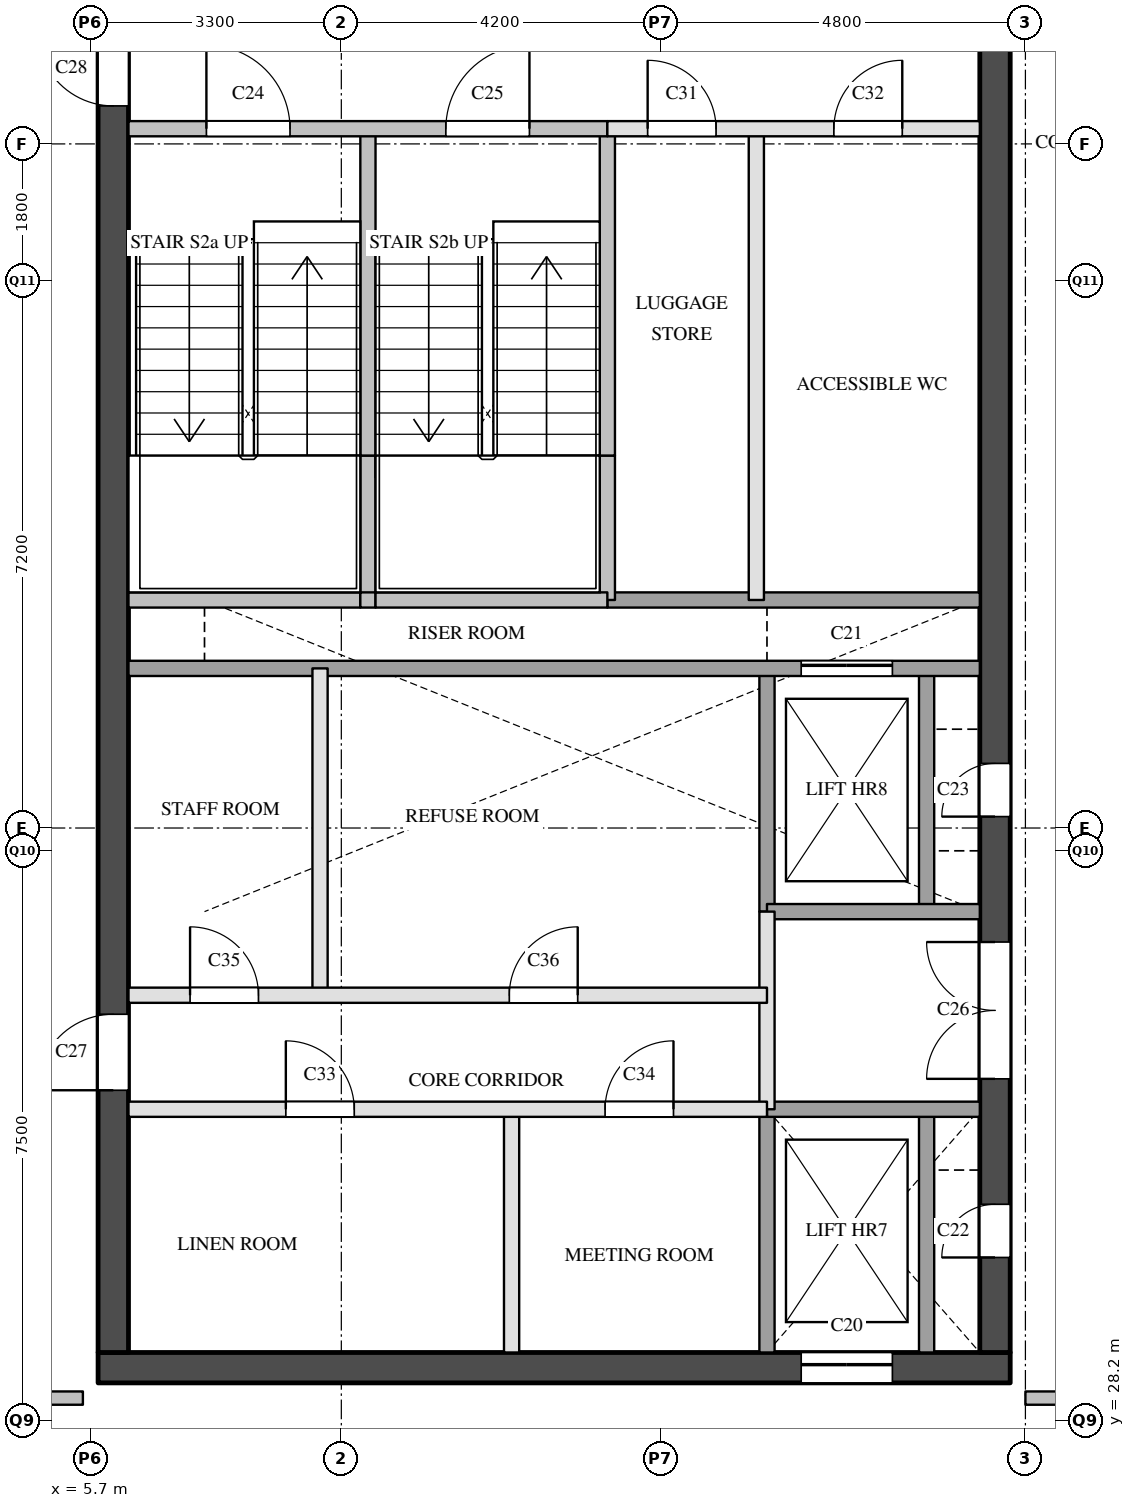
"""IFC4 building model, lengths in metres.
Left out: names, types, materials, properties, quantities, classifications, styles, units other than length and angle.
Written with IfcOpenShell. Run it as: python <this file> out.ifc"""

import sys

from ifc_helpers import new_model, si_unit, direction, frame, frame_2d, origin, place, context, subcontext, project, spatial, rectangle, extrude, element, fill, save


model = new_model("IFC4")
c1 = context("Model", 3, precision=1e-05, world=origin(), true_north=direction((0.0, 1.0)))
c2 = subcontext(c1, "Body", "Model", "MODEL_VIEW")
j1 = project(units=[si_unit("LENGTHUNIT", "METRE"), si_unit("PLANEANGLEUNIT", "RADIAN")], contexts=[c1])
p1 = place(None, origin())
s1 = spatial("IfcSite", under=j1, at=p1, CompositionType="ELEMENT")
p2 = place(p1, origin())
s2 = spatial("IfcBuilding", under=s1, at=p2, CompositionType="ELEMENT")
p3 = place(p2, frame((0.0, 0.0, 218.9)))
s3 = spatial("IfcBuildingStorey", under=s2, at=p3, CompositionType="ELEMENT", Elevation=218.9)
p4 = place(p3, frame((5.8, 28.9, 0.0), z_axis=(0.0, 0.0, 1.0), x_axis=(1.0, 0.0, 0.0)))
e1 = element("IfcWall", 1, at=p4, inside=s3, PredefinedType="SHEAR", context=c2, shape_type="SweptSolid", body=[
    extrude(rectangle(XDim=12.0, YDim=0.4, at=frame_2d((6.0, 0.0))), origin(), (0.0, 0.0, 1.0), 3.6),
])
p5 = place(p4, frame((9.25, 0.0, 0.0)))
e2 = element("IfcOpeningElement", 2, at=p5, cuts=e1, PredefinedType="OPENING", context=c2, shape_type="SweptSolid", body=[
    extrude(rectangle(XDim=1.2, YDim=2.1, at=frame_2d((0.6, 1.05))), frame((0.0, 0.21, 0.0), z_axis=(0.0, -1.0, 0.0), x_axis=(1.0, 0.0, 0.0)), (0.0, 0.0, 1.0), 0.42),
])
p6 = place(p3, frame((6.0, 29.1, 0.0), z_axis=(0.0, 0.0, 1.0), x_axis=(0.0, 1.0, 0.0)))
e3 = element("IfcWall", 3, at=p6, inside=s3, PredefinedType="SHEAR", context=c2, shape_type="SweptSolid", body=[
    extrude(rectangle(XDim=20.3, YDim=0.4, at=frame_2d((10.15, 0.0))), origin(), (0.0, 0.0, 1.0), 3.6),
])
p7 = place(p6, frame((3.45, 0.0, 0.0)))
e4 = element("IfcOpeningElement", 4, at=p7, cuts=e3, PredefinedType="OPENING", context=c2, shape_type="SweptSolid", body=[
    extrude(rectangle(XDim=1.0, YDim=2.1, at=frame_2d((0.5, 1.05))), frame((0.0, 0.21, 0.0), z_axis=(0.0, -1.0, 0.0), x_axis=(1.0, 0.0, 0.0)), (0.0, 0.0, 1.0), 0.42),
])
p8 = place(p6, frame((16.4, 0.0, 0.0)))
e5 = element("IfcOpeningElement", 5, at=p8, cuts=e3, PredefinedType="OPENING", context=c2, shape_type="SweptSolid", body=[
    extrude(rectangle(XDim=1.0, YDim=2.1, at=frame_2d((0.5, 1.05))), frame((0.0, 0.21, 0.0), z_axis=(0.0, -1.0, 0.0), x_axis=(1.0, 0.0, 0.0)), (0.0, 0.0, 1.0), 0.42),
])
p9 = place(p3, frame((17.6, 29.1, 0.0), z_axis=(0.0, 0.0, 1.0), x_axis=(0.0, 1.0, 0.0)))
e6 = element("IfcWall", 6, at=p9, inside=s3, PredefinedType="SHEAR", context=c2, shape_type="SweptSolid", body=[
    extrude(rectangle(XDim=20.3, YDim=0.4, at=frame_2d((10.15, 0.0))), origin(), (0.0, 0.0, 1.0), 3.6),
])
p10 = place(p9, frame((1.25, 0.0, 0.0)))
e7 = element("IfcOpeningElement", 7, at=p10, cuts=e6, PredefinedType="OPENING", context=c2, shape_type="SweptSolid", body=[
    extrude(rectangle(XDim=0.7, YDim=2.1, at=frame_2d((0.35, 1.05))), frame((0.0, 0.21, 0.0), z_axis=(0.0, -1.0, 0.0), x_axis=(1.0, 0.0, 0.0)), (0.0, 0.0, 1.0), 0.42),
])
p11 = place(p9, frame((7.05, 0.0, 0.0)))
e8 = element("IfcOpeningElement", 8, at=p11, cuts=e6, PredefinedType="OPENING", context=c2, shape_type="SweptSolid", body=[
    extrude(rectangle(XDim=0.7, YDim=2.1, at=frame_2d((0.35, 1.05))), frame((0.0, 0.21, 0.0), z_axis=(0.0, -1.0, 0.0), x_axis=(1.0, 0.0, 0.0)), (0.0, 0.0, 1.0), 0.42),
])
p12 = place(p9, frame((3.6, 0.0, 0.0)))
e9 = element("IfcOpeningElement", 9, at=p12, cuts=e6, PredefinedType="OPENING", context=c2, shape_type="SweptSolid", body=[
    extrude(rectangle(XDim=1.8, YDim=2.1, at=frame_2d((0.9, 1.05))), frame((0.0, 0.21, 0.0), z_axis=(0.0, -1.0, 0.0), x_axis=(1.0, 0.0, 0.0)), (0.0, 0.0, 1.0), 0.42),
])
p13 = place(p3, frame((8.72, 33.8, 0.0), z_axis=(0.0, 0.0, 1.0), x_axis=(0.0, 1.0, 0.0)))
e10 = element("IfcWall", 10, at=p13, inside=s3, PredefinedType="PARTITIONING", context=c2, shape_type="SweptSolid", body=[
    extrude(rectangle(XDim=4.3, YDim=0.2, at=frame_2d((2.15, 0.0))), origin(), (0.0, 0.0, 1.0), 3.6),
])
p14 = place(p3, frame((9.35, 39.0, 0.0), z_axis=(0.0, 0.0, 1.0), x_axis=(0.0, 1.0, 0.0)))
e11 = element("IfcWall", 11, at=p14, inside=s3, PredefinedType="SOLIDWALL", context=c2, shape_type="SweptSolid", body=[
    extrude(rectangle(XDim=1.9, YDim=0.2, at=frame_2d((0.95, 0.0))), origin(), (0.0, 0.0, 1.0), 3.6),
])
p15 = place(p3, frame((9.35, 40.9, 0.0), z_axis=(0.0, 0.0, 1.0), x_axis=(0.0, 1.0, 0.0)))
e12 = element("IfcWall", 12, at=p15, inside=s3, PredefinedType="SOLIDWALL", context=c2, shape_type="SweptSolid", body=[
    extrude(rectangle(XDim=4.3, YDim=0.2, at=frame_2d((2.15, 0.0))), origin(), (0.0, 0.0, 1.0), 3.6),
])
p16 = place(p3, frame((11.24, 29.1, 0.0), z_axis=(0.0, 0.0, 1.0), x_axis=(0.0, 1.0, 0.0)))
e13 = element("IfcWall", 13, at=p16, inside=s3, PredefinedType="PARTITIONING", context=c2, shape_type="SweptSolid", body=[
    extrude(rectangle(XDim=3.2, YDim=0.2, at=frame_2d((1.6, 0.0))), origin(), (0.0, 0.0, 1.0), 3.6),
])
p17 = place(p3, frame((12.5, 39.0, 0.0), z_axis=(0.0, 0.0, 1.0), x_axis=(0.0, 1.0, 0.0)))
e14 = element("IfcWall", 14, at=p17, inside=s3, PredefinedType="SOLIDWALL", context=c2, shape_type="SweptSolid", body=[
    extrude(rectangle(XDim=1.9, YDim=0.2, at=frame_2d((0.95, 0.0))), origin(), (0.0, 0.0, 1.0), 3.6),
])
p18 = place(p3, frame((12.5, 40.9, 0.0), z_axis=(0.0, 0.0, 1.0), x_axis=(0.0, 1.0, 0.0)))
e15 = element("IfcWall", 15, at=p18, inside=s3, PredefinedType="SOLIDWALL", context=c2, shape_type="SweptSolid", body=[
    extrude(rectangle(XDim=4.3, YDim=0.2, at=frame_2d((2.15, 0.0))), origin(), (0.0, 0.0, 1.0), 3.6),
])
p19 = place(p3, frame((14.46, 39.0, 0.0), z_axis=(0.0, 0.0, 1.0), x_axis=(0.0, 1.0, 0.0)))
e16 = element("IfcWall", 16, at=p19, inside=s3, PredefinedType="PARTITIONING", context=c2, shape_type="SweptSolid", body=[
    extrude(rectangle(XDim=6.2, YDim=0.2, at=frame_2d((3.1, 0.0))), origin(), (0.0, 0.0, 1.0), 3.6),
])
p20 = place(p3, frame((14.6, 32.3, 0.0), z_axis=(0.0, 0.0, 1.0), x_axis=(0.0, 1.0, 0.0)))
e17 = element("IfcWall", 17, at=p20, inside=s3, PredefinedType="PARTITIONING", context=c2, shape_type="SweptSolid", body=[
    extrude(rectangle(XDim=2.6, YDim=0.2, at=frame_2d((1.3, 0.0))), origin(), (0.0, 0.0, 1.0), 3.6),
])
p21 = place(p3, frame((14.6, 29.1, 0.0), z_axis=(0.0, 0.0, 1.0), x_axis=(0.0, 1.0, 0.0)))
e18 = element("IfcWall", 18, at=p21, inside=s3, PredefinedType="SOLIDWALL", context=c2, shape_type="SweptSolid", body=[
    extrude(rectangle(XDim=3.2, YDim=0.2, at=frame_2d((1.6, 0.0))), origin(), (0.0, 0.0, 1.0), 3.6),
])
p22 = place(p3, frame((14.6, 34.9, 0.0), z_axis=(0.0, 0.0, 1.0), x_axis=(0.0, 1.0, 0.0)))
e19 = element("IfcWall", 19, at=p22, inside=s3, PredefinedType="SOLIDWALL", context=c2, shape_type="SweptSolid", body=[
    extrude(rectangle(XDim=3.2, YDim=0.2, at=frame_2d((1.6, 0.0))), origin(), (0.0, 0.0, 1.0), 3.6),
])
p23 = place(p3, frame((16.7, 29.1, 0.0), z_axis=(0.0, 0.0, 1.0), x_axis=(0.0, 1.0, 0.0)))
e20 = element("IfcWall", 20, at=p23, inside=s3, PredefinedType="SOLIDWALL", context=c2, shape_type="SweptSolid", body=[
    extrude(rectangle(XDim=3.2, YDim=0.2, at=frame_2d((1.6, 0.0))), origin(), (0.0, 0.0, 1.0), 3.6),
])
p24 = place(p3, frame((16.7, 34.9, 0.0), z_axis=(0.0, 0.0, 1.0), x_axis=(0.0, 1.0, 0.0)))
e21 = element("IfcWall", 21, at=p24, inside=s3, PredefinedType="SOLIDWALL", context=c2, shape_type="SweptSolid", body=[
    extrude(rectangle(XDim=3.2, YDim=0.2, at=frame_2d((1.6, 0.0))), origin(), (0.0, 0.0, 1.0), 3.6),
])
p25 = place(p3, frame((6.2, 32.3, 0.0), z_axis=(0.0, 0.0, 1.0), x_axis=(1.0, 0.0, 0.0)))
e22 = element("IfcWall", 22, at=p25, inside=s3, PredefinedType="PARTITIONING", context=c2, shape_type="SweptSolid", body=[
    extrude(rectangle(XDim=8.4, YDim=0.2, at=frame_2d((4.2, 0.0))), origin(), (0.0, 0.0, 1.0), 3.6),
])
p26 = place(p25, frame((2.07, 0.0, 0.0)))
e23 = element("IfcOpeningElement", 23, at=p26, cuts=e22, PredefinedType="OPENING", context=c2, shape_type="SweptSolid", body=[
    extrude(rectangle(XDim=0.9, YDim=2.1, at=frame_2d((0.45, 1.05))), frame((0.0, 0.11, 0.0), z_axis=(0.0, -1.0, 0.0), x_axis=(1.0, 0.0, 0.0)), (0.0, 0.0, 1.0), 0.22),
])
p27 = place(p25, frame((6.27, 0.0, 0.0)))
e24 = element("IfcOpeningElement", 24, at=p27, cuts=e22, PredefinedType="OPENING", context=c2, shape_type="SweptSolid", body=[
    extrude(rectangle(XDim=0.9, YDim=2.1, at=frame_2d((0.45, 1.05))), frame((0.0, 0.11, 0.0), z_axis=(0.0, -1.0, 0.0), x_axis=(1.0, 0.0, 0.0)), (0.0, 0.0, 1.0), 0.22),
])
p28 = place(p3, frame((14.6, 32.3, 0.0), z_axis=(0.0, 0.0, 1.0), x_axis=(1.0, 0.0, 0.0)))
e25 = element("IfcWall", 25, at=p28, inside=s3, PredefinedType="SOLIDWALL", context=c2, shape_type="SweptSolid", body=[
    extrude(rectangle(XDim=2.8, YDim=0.2, at=frame_2d((1.4, 0.0))), origin(), (0.0, 0.0, 1.0), 3.6),
])
p29 = place(p3, frame((6.2, 33.8, 0.0), z_axis=(0.0, 0.0, 1.0), x_axis=(1.0, 0.0, 0.0)))
e26 = element("IfcWall", 26, at=p29, inside=s3, PredefinedType="PARTITIONING", context=c2, shape_type="SweptSolid", body=[
    extrude(rectangle(XDim=8.4, YDim=0.2, at=frame_2d((4.2, 0.0))), origin(), (0.0, 0.0, 1.0), 3.6),
])
p30 = place(p29, frame((0.81, 0.0, 0.0)))
e27 = element("IfcOpeningElement", 27, at=p30, cuts=e26, PredefinedType="OPENING", context=c2, shape_type="SweptSolid", body=[
    extrude(rectangle(XDim=0.9, YDim=2.1, at=frame_2d((0.45, 1.05))), frame((0.0, 0.11, 0.0), z_axis=(0.0, -1.0, 0.0), x_axis=(1.0, 0.0, 0.0)), (0.0, 0.0, 1.0), 0.22),
])
p31 = place(p29, frame((5.01, 0.0, 0.0)))
e28 = element("IfcOpeningElement", 28, at=p31, cuts=e26, PredefinedType="OPENING", context=c2, shape_type="SweptSolid", body=[
    extrude(rectangle(XDim=0.9, YDim=2.1, at=frame_2d((0.45, 1.05))), frame((0.0, 0.11, 0.0), z_axis=(0.0, -1.0, 0.0), x_axis=(1.0, 0.0, 0.0)), (0.0, 0.0, 1.0), 0.22),
])
p32 = place(p3, frame((14.6, 34.9, 0.0), z_axis=(0.0, 0.0, 1.0), x_axis=(1.0, 0.0, 0.0)))
e29 = element("IfcWall", 29, at=p32, inside=s3, PredefinedType="SOLIDWALL", context=c2, shape_type="SweptSolid", body=[
    extrude(rectangle(XDim=2.8, YDim=0.2, at=frame_2d((1.4, 0.0))), origin(), (0.0, 0.0, 1.0), 3.6),
])
p33 = place(p3, frame((6.2, 38.1, 0.0), z_axis=(0.0, 0.0, 1.0), x_axis=(1.0, 0.0, 0.0)))
e30 = element("IfcWall", 30, at=p33, inside=s3, PredefinedType="SOLIDWALL", context=c2, shape_type="SweptSolid", body=[
    extrude(rectangle(XDim=11.2, YDim=0.2, at=frame_2d((5.6, 0.0))), origin(), (0.0, 0.0, 1.0), 3.6),
])
p34 = place(p33, frame((8.85, 0.0, 0.0)))
e31 = element("IfcOpeningElement", 31, at=p34, cuts=e30, PredefinedType="OPENING", context=c2, shape_type="SweptSolid", body=[
    extrude(rectangle(XDim=1.2, YDim=2.1, at=frame_2d((0.6, 1.05))), frame((0.0, 0.11, 0.0), z_axis=(0.0, -1.0, 0.0), x_axis=(1.0, 0.0, 0.0)), (0.0, 0.0, 1.0), 0.22),
])
p35 = place(p3, frame((12.5, 39.0, 0.0), z_axis=(0.0, 0.0, 1.0), x_axis=(1.0, 0.0, 0.0)))
e32 = element("IfcWall", 32, at=p35, inside=s3, PredefinedType="SOLIDWALL", context=c2, shape_type="SweptSolid", body=[
    extrude(rectangle(XDim=4.9, YDim=0.2, at=frame_2d((2.45, 0.0))), origin(), (0.0, 0.0, 1.0), 3.6),
])
p36 = place(p3, frame((6.2, 39.0, 0.0), z_axis=(0.0, 0.0, 1.0), x_axis=(1.0, 0.0, 0.0)))
e33 = element("IfcWall", 33, at=p36, inside=s3, PredefinedType="SOLIDWALL", context=c2, shape_type="SweptSolid", body=[
    extrude(rectangle(XDim=3.05, YDim=0.2, at=frame_2d((1.525, 0.0))), origin(), (0.0, 0.0, 1.0), 3.6),
])
p37 = place(p3, frame((9.25, 39.0, 0.0), z_axis=(0.0, 0.0, 1.0), x_axis=(1.0, 0.0, 0.0)))
e34 = element("IfcWall", 34, at=p37, inside=s3, PredefinedType="SOLIDWALL", context=c2, shape_type="SweptSolid", body=[
    extrude(rectangle(XDim=0.2, YDim=0.2, at=frame_2d((0.1, 0.0))), origin(), (0.0, 0.0, 1.0), 3.6),
])
p38 = place(p3, frame((9.45, 39.0, 0.0), z_axis=(0.0, 0.0, 1.0), x_axis=(1.0, 0.0, 0.0)))
e35 = element("IfcWall", 35, at=p38, inside=s3, PredefinedType="SOLIDWALL", context=c2, shape_type="SweptSolid", body=[
    extrude(rectangle(XDim=3.05, YDim=0.2, at=frame_2d((1.525, 0.0))), origin(), (0.0, 0.0, 1.0), 3.6),
])
p39 = place(p3, frame((12.5, 45.2, 0.0), z_axis=(0.0, 0.0, 1.0), x_axis=(1.0, 0.0, 0.0)))
e36 = element("IfcWall", 36, at=p39, inside=s3, PredefinedType="PARTITIONING", context=c2, shape_type="SweptSolid", body=[
    extrude(rectangle(XDim=4.9, YDim=0.2, at=frame_2d((2.45, 0.0))), origin(), (0.0, 0.0, 1.0), 3.6),
])
p40 = place(p39, frame((0.53, 0.0, 0.0)))
e37 = element("IfcOpeningElement", 37, at=p40, cuts=e36, PredefinedType="OPENING", context=c2, shape_type="SweptSolid", body=[
    extrude(rectangle(XDim=0.9, YDim=2.1, at=frame_2d((0.45, 1.05))), frame((0.0, 0.11, 0.0), z_axis=(0.0, -1.0, 0.0), x_axis=(1.0, 0.0, 0.0)), (0.0, 0.0, 1.0), 0.22),
])
p41 = place(p39, frame((2.98, 0.0, 0.0)))
e38 = element("IfcOpeningElement", 38, at=p41, cuts=e36, PredefinedType="OPENING", context=c2, shape_type="SweptSolid", body=[
    extrude(rectangle(XDim=0.9, YDim=2.1, at=frame_2d((0.45, 1.05))), frame((0.0, 0.11, 0.0), z_axis=(0.0, -1.0, 0.0), x_axis=(1.0, 0.0, 0.0)), (0.0, 0.0, 1.0), 0.22),
])
p42 = place(p3, frame((6.2, 45.2, 0.0), z_axis=(0.0, 0.0, 1.0), x_axis=(1.0, 0.0, 0.0)))
e39 = element("IfcWall", 39, at=p42, inside=s3, PredefinedType="SOLIDWALL", context=c2, shape_type="SweptSolid", body=[
    extrude(rectangle(XDim=6.3, YDim=0.2, at=frame_2d((3.15, 0.0))), origin(), (0.0, 0.0, 1.0), 3.6),
])
p43 = place(p42, frame((1.025, 0.0, 0.0)))
e40 = element("IfcOpeningElement", 40, at=p43, cuts=e39, PredefinedType="OPENING", context=c2, shape_type="SweptSolid", body=[
    extrude(rectangle(XDim=1.1, YDim=2.1, at=frame_2d((0.55, 1.05))), frame((0.0, 0.11, 0.0), z_axis=(0.0, -1.0, 0.0), x_axis=(1.0, 0.0, 0.0)), (0.0, 0.0, 1.0), 0.22),
])
p44 = place(p42, frame((4.175, 0.0, 0.0)))
e41 = element("IfcOpeningElement", 41, at=p44, cuts=e39, PredefinedType="OPENING", context=c2, shape_type="SweptSolid", body=[
    extrude(rectangle(XDim=1.1, YDim=2.1, at=frame_2d((0.55, 1.05))), frame((0.0, 0.11, 0.0), z_axis=(0.0, -1.0, 0.0), x_axis=(1.0, 0.0, 0.0)), (0.0, 0.0, 1.0), 0.22),
])
for number, where, z_axis, x_axis in (
    (42, (4.1, 28.5, 0.0), (0.0, 0.0, 1.0), (1.0, 0.0, 0.0)),
    (43, (18.0, 28.5, 0.0), (0.0, 0.0, 1.0), (1.0, 0.0, 0.0)),
):
    element("IfcWall", number, at=place(p3, frame(where, z_axis=z_axis, x_axis=x_axis)), inside=s3, PredefinedType="PARTITIONING", context=c2, shape_type="SweptSolid", body=[
        extrude(rectangle(XDim=1.5, YDim=0.175, at=frame_2d((0.75, 0.0))), origin(), (0.0, 0.0, 1.0), 3.6),
    ])
p45 = place(p5, origin())
e44 = element("IfcDoor", 44, at=p45, inside=s3, OperationType="SLIDING_TO_LEFT", PredefinedType="DOOR", context=c2, shape_type="SweptSolid", body=[
    extrude(rectangle(XDim=1.2, YDim=2.1, at=frame_2d((0.6, 1.05))), frame((0.0, 0.025, 0.0), z_axis=(0.0, -1.0, 0.0), x_axis=(1.0, 0.0, 0.0)), (0.0, 0.0, 1.0), 0.05),
])
fill(e2, e44)
p46 = place(p34, origin())
e45 = element("IfcDoor", 45, at=p46, inside=s3, OperationType="SLIDING_TO_LEFT", PredefinedType="DOOR", context=c2, shape_type="SweptSolid", body=[
    extrude(rectangle(XDim=1.2, YDim=2.1, at=frame_2d((0.6, 1.05))), frame((0.0, 0.025, 0.0), z_axis=(0.0, -1.0, 0.0), x_axis=(1.0, 0.0, 0.0)), (0.0, 0.0, 1.0), 0.05),
])
fill(e31, e45)
p47 = place(p10, origin())
e46 = element("IfcDoor", 46, at=p47, inside=s3, OperationType="SINGLE_SWING_LEFT", PredefinedType="DOOR", context=c2, shape_type="SweptSolid", body=[
    extrude(rectangle(XDim=0.7, YDim=2.1, at=frame_2d((0.35, 1.05))), frame((0.0, 0.025, 0.0), z_axis=(0.0, -1.0, 0.0), x_axis=(1.0, 0.0, 0.0)), (0.0, 0.0, 1.0), 0.05),
])
fill(e7, e46)
p48 = place(p11, origin())
e47 = element("IfcDoor", 47, at=p48, inside=s3, OperationType="SINGLE_SWING_LEFT", PredefinedType="DOOR", context=c2, shape_type="SweptSolid", body=[
    extrude(rectangle(XDim=0.7, YDim=2.1, at=frame_2d((0.35, 1.05))), frame((0.0, 0.025, 0.0), z_axis=(0.0, -1.0, 0.0), x_axis=(1.0, 0.0, 0.0)), (0.0, 0.0, 1.0), 0.05),
])
fill(e8, e47)
p49 = place(p43, origin())
e48 = element("IfcDoor", 48, at=p49, inside=s3, OperationType="SINGLE_SWING_LEFT", PredefinedType="DOOR", context=c2, shape_type="SweptSolid", body=[
    extrude(rectangle(XDim=1.1, YDim=2.1, at=frame_2d((0.55, 1.05))), frame((0.0, 0.025, 0.0), z_axis=(0.0, -1.0, 0.0), x_axis=(1.0, 0.0, 0.0)), (0.0, 0.0, 1.0), 0.05),
])
fill(e40, e48)
p50 = place(p44, origin())
e49 = element("IfcDoor", 49, at=p50, inside=s3, OperationType="SINGLE_SWING_RIGHT", PredefinedType="DOOR", context=c2, shape_type="SweptSolid", body=[
    extrude(rectangle(XDim=1.1, YDim=2.1, at=frame_2d((0.55, 1.05))), frame((0.0, 0.025, 0.0), z_axis=(0.0, -1.0, 0.0), x_axis=(1.0, 0.0, 0.0)), (0.0, 0.0, 1.0), 0.05),
])
fill(e41, e49)
p51 = place(p12, origin())
e50 = element("IfcDoor", 50, at=p51, inside=s3, OperationType="DOUBLE_DOOR_SINGLE_SWING", PredefinedType="DOOR", context=c2, shape_type="SweptSolid", body=[
    extrude(rectangle(XDim=1.8, YDim=2.1, at=frame_2d((0.9, 1.05))), frame((0.0, 0.025, 0.0), z_axis=(0.0, -1.0, 0.0), x_axis=(1.0, 0.0, 0.0)), (0.0, 0.0, 1.0), 0.05),
])
fill(e9, e50)
p52 = place(p7, origin())
e51 = element("IfcDoor", 51, at=p52, inside=s3, OperationType="SINGLE_SWING_LEFT", PredefinedType="DOOR", context=c2, shape_type="SweptSolid", body=[
    extrude(rectangle(XDim=1.0, YDim=2.1, at=frame_2d((0.5, 1.05))), frame((0.0, 0.025, 0.0), z_axis=(0.0, -1.0, 0.0), x_axis=(1.0, 0.0, 0.0)), (0.0, 0.0, 1.0), 0.05),
])
fill(e4, e51)
p53 = place(p8, origin())
e52 = element("IfcDoor", 52, at=p53, inside=s3, OperationType="SINGLE_SWING_RIGHT", PredefinedType="DOOR", context=c2, shape_type="SweptSolid", body=[
    extrude(rectangle(XDim=1.0, YDim=2.1, at=frame_2d((0.5, 1.05))), frame((0.0, 0.025, 0.0), z_axis=(0.0, -1.0, 0.0), x_axis=(1.0, 0.0, 0.0)), (0.0, 0.0, 1.0), 0.05),
])
fill(e5, e52)
p54 = place(p40, origin())
e53 = element("IfcDoor", 53, at=p54, inside=s3, OperationType="SINGLE_SWING_LEFT", PredefinedType="DOOR", context=c2, shape_type="SweptSolid", body=[
    extrude(rectangle(XDim=0.9, YDim=2.1, at=frame_2d((0.45, 1.05))), frame((0.0, 0.025, 0.0), z_axis=(0.0, -1.0, 0.0), x_axis=(1.0, 0.0, 0.0)), (0.0, 0.0, 1.0), 0.05),
])
fill(e37, e53)
p55 = place(p41, origin())
e54 = element("IfcDoor", 54, at=p55, inside=s3, OperationType="SINGLE_SWING_RIGHT", PredefinedType="DOOR", context=c2, shape_type="SweptSolid", body=[
    extrude(rectangle(XDim=0.9, YDim=2.1, at=frame_2d((0.45, 1.05))), frame((0.0, 0.025, 0.0), z_axis=(0.0, -1.0, 0.0), x_axis=(1.0, 0.0, 0.0)), (0.0, 0.0, 1.0), 0.05),
])
fill(e38, e54)
p56 = place(p26, origin())
e55 = element("IfcDoor", 55, at=p56, inside=s3, OperationType="SINGLE_SWING_LEFT", PredefinedType="DOOR", context=c2, shape_type="SweptSolid", body=[
    extrude(rectangle(XDim=0.9, YDim=2.1, at=frame_2d((0.45, 1.05))), frame((0.0, 0.025, 0.0), z_axis=(0.0, -1.0, 0.0), x_axis=(1.0, 0.0, 0.0)), (0.0, 0.0, 1.0), 0.05),
])
fill(e23, e55)
p57 = place(p27, origin())
e56 = element("IfcDoor", 56, at=p57, inside=s3, OperationType="SINGLE_SWING_RIGHT", PredefinedType="DOOR", context=c2, shape_type="SweptSolid", body=[
    extrude(rectangle(XDim=0.9, YDim=2.1, at=frame_2d((0.45, 1.05))), frame((0.0, 0.025, 0.0), z_axis=(0.0, -1.0, 0.0), x_axis=(1.0, 0.0, 0.0)), (0.0, 0.0, 1.0), 0.05),
])
fill(e24, e56)
p58 = place(p30, origin())
e57 = element("IfcDoor", 57, at=p58, inside=s3, OperationType="SINGLE_SWING_LEFT", PredefinedType="DOOR", context=c2, shape_type="SweptSolid", body=[
    extrude(rectangle(XDim=0.9, YDim=2.1, at=frame_2d((0.45, 1.05))), frame((0.0, 0.025, 0.0), z_axis=(0.0, -1.0, 0.0), x_axis=(1.0, 0.0, 0.0)), (0.0, 0.0, 1.0), 0.05),
])
fill(e27, e57)
p59 = place(p31, origin())
e58 = element("IfcDoor", 58, at=p59, inside=s3, OperationType="SINGLE_SWING_RIGHT", PredefinedType="DOOR", context=c2, shape_type="SweptSolid", body=[
    extrude(rectangle(XDim=0.9, YDim=2.1, at=frame_2d((0.45, 1.05))), frame((0.0, 0.025, 0.0), z_axis=(0.0, -1.0, 0.0), x_axis=(1.0, 0.0, 0.0)), (0.0, 0.0, 1.0), 0.05),
])
fill(e28, e58)
save(model, sys.argv[1])
